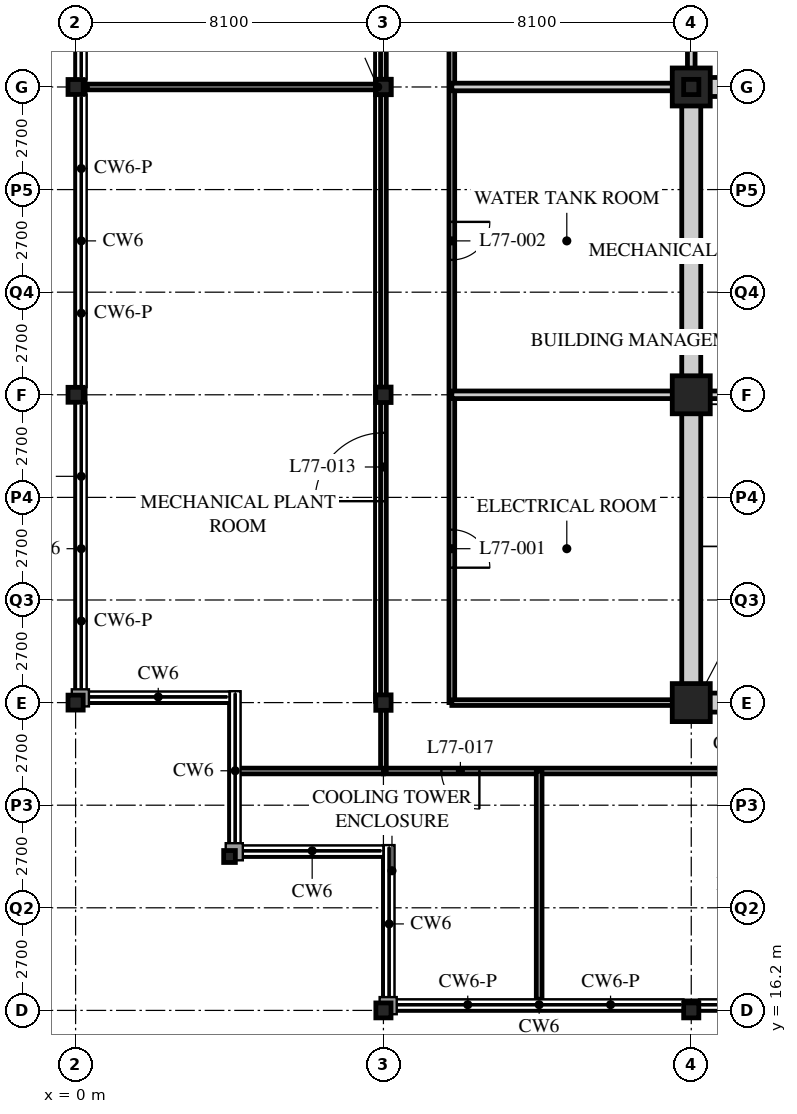
"""IFC4 building model, lengths in metres.
Left out: names, types, materials, properties, quantities, classifications, styles, units other than length and angle.
Written with IfcOpenShell. Run it as: python <this file> out.ifc"""

import sys

from ifc_helpers import new_model, si_unit, direction, frame, frame_2d, origin, origin_2d, place, context, subcontext, project, spatial, rectangle, hollow_rectangle, i_section, extrude, element, fill, save


model = new_model("IFC4")
c1 = context("Model", 3, precision=1e-05, world=origin(), true_north=direction((0.0, 1.0)))
c2 = subcontext(c1, "Body", "Model", "MODEL_VIEW")
j1 = project(units=[si_unit("LENGTHUNIT", "METRE"), si_unit("PLANEANGLEUNIT", "RADIAN")], contexts=[c1])
p1 = place(None, origin())
s1 = spatial("IfcSite", under=j1, at=p1, CompositionType="ELEMENT")
p2 = place(p1, origin())
s2 = spatial("IfcBuilding", under=s1, at=p2, CompositionType="ELEMENT")
p3 = place(p2, frame((0.0, 0.0, 303.9)))
s3 = spatial("IfcBuildingStorey", under=s2, at=p3, CompositionType="ELEMENT", Elevation=303.9)
for number, where, z_axis, x_axis in (
    (1, (0.0, 24.3, 0.0), (0.0, 0.0, 1.0), (1.0, 0.0, 0.0)),
    (2, (0.0, 32.4, 0.0), (0.0, 0.0, 1.0), (1.0, 0.0, 0.0)),
    (3, (0.0, 40.5, 0.0), (0.0, 0.0, 1.0), (1.0, 0.0, 0.0)),
):
    element("IfcColumn", number, at=place(p3, frame(where, z_axis=z_axis, x_axis=x_axis)), inside=s3, PredefinedType="COLUMN", context=c2, shape_type="SweptSolid", body=[
        extrude(i_section(OverallWidth=0.399, OverallDepth=0.394, WebThickness=0.023, FlangeThickness=0.037, FilletRadius=0.015, at=origin_2d()), origin(), (0.0, 0.0, 1.0), 6.0),
    ])
p4 = place(p3, frame((4.05, 20.25, 0.0), z_axis=(0.0, 0.0, 1.0), x_axis=(1.0, 0.0, 0.0)))
e4 = element("IfcColumn", 4, at=p4, inside=s3, PredefinedType="COLUMN", context=c2, shape_type="SweptSolid", body=[
    extrude(i_section(OverallWidth=0.307, OverallDepth=0.314, WebThickness=0.012, FlangeThickness=0.019, FilletRadius=0.015, at=origin_2d()), origin(), (0.0, 0.0, 1.0), 6.0),
])
p5 = place(p3, frame((8.1, 16.2, 0.0), z_axis=(0.0, 0.0, 1.0), x_axis=(1.0, 0.0, 0.0)))
e5 = element("IfcColumn", 5, at=p5, inside=s3, PredefinedType="COLUMN", context=c2, shape_type="SweptSolid", body=[
    extrude(i_section(OverallWidth=0.399, OverallDepth=0.394, WebThickness=0.023, FlangeThickness=0.037, FilletRadius=0.015, at=origin_2d()), origin(), (0.0, 0.0, 1.0), 6.0),
])
for number, where, z_axis, x_axis in (
    (6, (8.1, 24.3, 0.0), (0.0, 0.0, 1.0), (1.0, 0.0, 0.0)),
    (7, (8.1, 32.4, 0.0), (0.0, 0.0, 1.0), (1.0, 0.0, 0.0)),
    (8, (8.1, 40.5, 0.0), (0.0, 0.0, 1.0), (1.0, 0.0, 0.0)),
):
    element("IfcColumn", number, at=place(p3, frame(where, z_axis=z_axis, x_axis=x_axis)), inside=s3, PredefinedType="COLUMN", context=c2, shape_type="SweptSolid", body=[
        extrude(i_section(OverallWidth=0.403, OverallDepth=0.406, WebThickness=0.027, FlangeThickness=0.043, FilletRadius=0.015, at=origin_2d()), origin(), (0.0, 0.0, 1.0), 6.0),
    ])
p6 = place(p3, frame((16.2, 16.2, 0.0), z_axis=(0.0, 0.0, 1.0), x_axis=(1.0, 0.0, 0.0)))
e9 = element("IfcColumn", 9, at=p6, inside=s3, PredefinedType="COLUMN", context=c2, shape_type="SweptSolid", body=[
    extrude(i_section(OverallWidth=0.399, OverallDepth=0.394, WebThickness=0.023, FlangeThickness=0.037, FilletRadius=0.015, at=origin_2d()), origin(), (0.0, 0.0, 1.0), 6.0),
])
for number, where, z_axis, x_axis in (
    (10, (16.2, 24.3, 0.0), (0.0, 0.0, 1.0), (1.0, 0.0, 0.0)),
    (11, (16.2, 32.4, 0.0), (0.0, 0.0, 1.0), (1.0, 0.0, 0.0)),
    (12, (16.2, 40.5, 0.0), (0.0, 0.0, 1.0), (1.0, 0.0, 0.0)),
):
    element("IfcColumn", number, at=place(p3, frame(where, z_axis=z_axis, x_axis=x_axis)), inside=s3, PredefinedType="COLUMN", context=c2, shape_type="SweptSolid", body=[
        extrude(hollow_rectangle(XDim=1.0, YDim=1.0, WallThickness=0.1, at=origin_2d()), origin(), (0.0, 0.0, 1.0), 6.0),
    ])
p7 = place(p3, frame((8.35, 16.325, 6.0), z_axis=(0.0, 0.0, 1.0), x_axis=(1.0, 0.0, 0.0)))
e13 = element("IfcWall", 13, at=p7, inside=s3, PredefinedType="PARAPET", context=c2, shape_type="SweptSolid", body=[
    extrude(rectangle(XDim=40.25, YDim=0.25, at=frame_2d((20.125, 0.0))), origin(), (0.0, 0.0, 1.0), 1.285),
])
p8 = place(p3, frame((0.125, 56.45, 6.0), z_axis=(0.0, 0.0, 1.0), x_axis=(0.0, -1.0, 0.0)))
e14 = element("IfcWall", 14, at=p8, inside=s3, PredefinedType="PARAPET", context=c2, shape_type="SweptSolid", body=[
    extrude(rectangle(XDim=32.15, YDim=0.25, at=frame_2d((16.075, 0.0))), origin(), (0.0, 0.0, 1.0), 1.285),
])
p9 = place(p3, frame((0.25, 24.425, 6.0), z_axis=(0.0, 0.0, 1.0), x_axis=(1.0, 0.0, 0.0)))
e15 = element("IfcWall", 15, at=p9, inside=s3, PredefinedType="PARAPET", context=c2, shape_type="SweptSolid", body=[
    extrude(rectangle(XDim=3.8, YDim=0.25, at=frame_2d((1.9, 0.0))), origin(), (0.0, 0.0, 1.0), 1.285),
])
p10 = place(p3, frame((4.175, 24.55, 6.0), z_axis=(0.0, 0.0, 1.0), x_axis=(0.0, -1.0, 0.0)))
e16 = element("IfcWall", 16, at=p10, inside=s3, PredefinedType="PARAPET", context=c2, shape_type="SweptSolid", body=[
    extrude(rectangle(XDim=4.3, YDim=0.25, at=frame_2d((2.15, 0.0))), origin(), (0.0, 0.0, 1.0), 1.285),
])
p11 = place(p3, frame((4.3, 20.375, 6.0), z_axis=(0.0, 0.0, 1.0), x_axis=(1.0, 0.0, 0.0)))
e17 = element("IfcWall", 17, at=p11, inside=s3, PredefinedType="PARAPET", context=c2, shape_type="SweptSolid", body=[
    extrude(rectangle(XDim=3.8, YDim=0.25, at=frame_2d((1.9, 0.0))), origin(), (0.0, 0.0, 1.0), 1.285),
])
p12 = place(p3, frame((8.225, 20.5, 6.0), z_axis=(0.0, 0.0, 1.0), x_axis=(0.0, -1.0, 0.0)))
e18 = element("IfcWall", 18, at=p12, inside=s3, PredefinedType="PARAPET", context=c2, shape_type="SweptSolid", body=[
    extrude(rectangle(XDim=4.3, YDim=0.25, at=frame_2d((2.15, 0.0))), origin(), (0.0, 0.0, 1.0), 1.285),
])
for number, where, z_axis, x_axis in (
    (19, (8.1, 40.5, 6.0), (0.0, 0.0, 1.0), (1.0, 0.0, 0.0)),
    (20, (16.2, 40.5, 6.0), (0.0, 0.0, 1.0), (1.0, 0.0, 0.0)),
):
    element("IfcColumn", number, at=place(p3, frame(where, z_axis=z_axis, x_axis=x_axis)), inside=s3, PredefinedType="COLUMN", context=c2, shape_type="SweptSolid", body=[
        extrude(hollow_rectangle(XDim=0.4, YDim=0.4, WallThickness=0.016, at=origin_2d()), origin(), (0.0, 0.0, 1.0), 13.896),
    ])
p13 = place(p3, frame((8.1, 22.5, 0.0), z_axis=(0.0, 0.0, 1.0), x_axis=(1.0, 0.0, 0.0)))
e21 = element("IfcWall", 21, at=p13, inside=s3, PredefinedType="PARTITIONING", context=c2, shape_type="SweptSolid", body=[
    extrude(rectangle(XDim=40.5, YDim=0.15, at=frame_2d((20.25, 0.0))), origin(), (0.0, 0.0, 1.0), 5.8),
])
p14 = place(p13, frame((11.25, 0.0, 0.0)))
e22 = element("IfcOpeningElement", 22, at=p14, cuts=e21, PredefinedType="OPENING", context=c2, shape_type="SweptSolid", body=[
    extrude(rectangle(XDim=1.8, YDim=2.4, at=frame_2d((0.9, 1.2))), frame((0.0, 0.085, 0.0), z_axis=(0.0, -1.0, 0.0), x_axis=(1.0, 0.0, 0.0)), (0.0, 0.0, 1.0), 0.17),
])
p15 = place(p13, frame((27.45, 0.0, 0.0)))
e23 = element("IfcOpeningElement", 23, at=p15, cuts=e21, PredefinedType="OPENING", context=c2, shape_type="SweptSolid", body=[
    extrude(rectangle(XDim=1.8, YDim=2.4, at=frame_2d((0.9, 1.2))), frame((0.0, 0.085, 0.0), z_axis=(0.0, -1.0, 0.0), x_axis=(1.0, 0.0, 0.0)), (0.0, 0.0, 1.0), 0.17),
])
p16 = place(p13, frame((1.525, 0.0, 0.0)))
e24 = element("IfcOpeningElement", 24, at=p16, cuts=e21, PredefinedType="OPENING", context=c2, shape_type="SweptSolid", body=[
    extrude(rectangle(XDim=1.0, YDim=2.1, at=frame_2d((0.5, 1.05))), frame((0.0, 0.085, 0.0), z_axis=(0.0, -1.0, 0.0), x_axis=(1.0, 0.0, 0.0)), (0.0, 0.0, 1.0), 0.17),
])
p17 = place(p13, frame((37.975, 0.0, 0.0)))
e25 = element("IfcOpeningElement", 25, at=p17, cuts=e21, PredefinedType="OPENING", context=c2, shape_type="SweptSolid", body=[
    extrude(rectangle(XDim=1.0, YDim=2.1, at=frame_2d((0.5, 1.05))), frame((0.0, 0.085, 0.0), z_axis=(0.0, -1.0, 0.0), x_axis=(1.0, 0.0, 0.0)), (0.0, 0.0, 1.0), 0.17),
])
p18 = place(p3, frame((8.1, 22.5, 0.0), z_axis=(0.0, 0.0, 1.0), x_axis=(0.0, 1.0, 0.0)))
e26 = element("IfcWall", 26, at=p18, inside=s3, PredefinedType="PARTITIONING", context=c2, shape_type="SweptSolid", body=[
    extrude(rectangle(XDim=34.24, YDim=0.15, at=frame_2d((17.12, 0.0))), origin(), (0.0, 0.0, 1.0), 5.038),
])
p19 = place(p18, frame((7.1, 0.0, 0.0)))
e27 = element("IfcOpeningElement", 27, at=p19, cuts=e26, PredefinedType="OPENING", context=c2, shape_type="SweptSolid", body=[
    extrude(rectangle(XDim=1.8, YDim=2.4, at=frame_2d((0.9, 1.2))), frame((0.0, 0.085, 0.0), z_axis=(0.0, -1.0, 0.0), x_axis=(1.0, 0.0, 0.0)), (0.0, 0.0, 1.0), 0.17),
])
p20 = place(p18, frame((26.95, 0.0, 0.0)))
e28 = element("IfcOpeningElement", 28, at=p20, cuts=e26, PredefinedType="OPENING", context=c2, shape_type="SweptSolid", body=[
    extrude(rectangle(XDim=1.8, YDim=2.4, at=frame_2d((0.9, 1.2))), frame((0.0, 0.085, 0.0), z_axis=(0.0, -1.0, 0.0), x_axis=(1.0, 0.0, 0.0)), (0.0, 0.0, 1.0), 0.17),
])
p21 = place(p3, frame((9.9, 54.9, 0.0), z_axis=(0.0, 0.0, 1.0), x_axis=(0.0, -1.0, 0.0)))
e29 = element("IfcWall", 29, at=p21, inside=s3, PredefinedType="PARTITIONING", context=c2, shape_type="SweptSolid", body=[
    extrude(rectangle(XDim=30.6, YDim=0.15, at=frame_2d((15.3, 0.0))), origin(), (0.0, 0.0, 1.0), 5.8),
])
p22 = place(p21, frame((26.05, 0.0, 0.0)))
e30 = element("IfcOpeningElement", 30, at=p22, cuts=e29, PredefinedType="OPENING", context=c2, shape_type="SweptSolid", body=[
    extrude(rectangle(XDim=1.0, YDim=2.1, at=frame_2d((0.5, 1.05))), frame((0.0, 0.085, 0.0), z_axis=(0.0, -1.0, 0.0), x_axis=(1.0, 0.0, 0.0)), (0.0, 0.0, 1.0), 0.17),
])
p23 = place(p21, frame((17.95, 0.0, 0.0)))
e31 = element("IfcOpeningElement", 31, at=p23, cuts=e29, PredefinedType="OPENING", context=c2, shape_type="SweptSolid", body=[
    extrude(rectangle(XDim=1.0, YDim=2.1, at=frame_2d((0.5, 1.05))), frame((0.0, 0.085, 0.0), z_axis=(0.0, -1.0, 0.0), x_axis=(1.0, 0.0, 0.0)), (0.0, 0.0, 1.0), 0.17),
])
p24 = place(p3, frame((9.9, 24.3, 0.0), z_axis=(0.0, 0.0, 1.0), x_axis=(1.0, 0.0, 0.0)))
e32 = element("IfcWall", 32, at=p24, inside=s3, PredefinedType="PARTITIONING", context=c2, shape_type="SweptSolid", body=[
    extrude(rectangle(XDim=6.1, YDim=0.15, at=frame_2d((3.05, 0.0))), origin(), (0.0, 0.0, 1.0), 5.038),
])
p25 = place(p3, frame((9.9, 32.4, 0.0), z_axis=(0.0, 0.0, 1.0), x_axis=(1.0, 0.0, 0.0)))
e33 = element("IfcWall", 33, at=p25, inside=s3, PredefinedType="SOLIDWALL", context=c2, shape_type="SweptSolid", body=[
    extrude(rectangle(XDim=6.3, YDim=0.2, at=frame_2d((3.15, 0.0))), origin(), (0.0, 0.0, 1.0), 5.038),
])
p26 = place(p3, frame((16.2, 40.5, 0.0), z_axis=(0.0, 0.0, 1.0), x_axis=(0.0, 1.0, 0.0)))
e34 = element("IfcWall", 34, at=p26, inside=s3, PredefinedType="SOLIDWALL", context=c2, shape_type="SweptSolid", body=[
    extrude(rectangle(XDim=14.4, YDim=0.2, at=frame_2d((7.2, 0.0))), origin(), (0.0, 0.0, 1.0), 5.038),
])
p27 = place(p3, frame((9.9, 40.5, 0.0), z_axis=(0.0, 0.0, 1.0), x_axis=(1.0, 0.0, 0.0)))
e35 = element("IfcWall", 35, at=p27, inside=s3, PredefinedType="SOLIDWALL", context=c2, shape_type="SweptSolid", body=[
    extrude(rectangle(XDim=6.3, YDim=0.2, at=frame_2d((3.15, 0.0))), origin(), (0.0, 0.0, 1.0), 5.038),
])
p28 = place(p3, frame((8.1, 40.5, 0.0), z_axis=(0.0, 0.0, 1.0), x_axis=(-1.0, 0.0, 0.0)))
e36 = element("IfcWall", 36, at=p28, inside=s3, PredefinedType="PARTITIONING", context=c2, shape_type="SweptSolid", body=[
    extrude(rectangle(XDim=7.8, YDim=0.15, at=frame_2d((3.9, 0.0))), origin(), (0.0, 0.0, 1.0), 5.038),
])
p29 = place(p3, frame((4.223, 22.5, 0.0), z_axis=(0.0, 0.0, 1.0), x_axis=(1.0, 0.0, 0.0)))
e37 = element("IfcWall", 37, at=p29, inside=s3, PredefinedType="PARTITIONING", context=c2, shape_type="SweptSolid", body=[
    extrude(rectangle(XDim=3.877, YDim=0.15, at=frame_2d((1.938, 0.0))), origin(), (0.0, 0.0, 1.0), 5.8),
])
p30 = place(p3, frame((12.198, 22.5, 0.0), z_axis=(0.0, 0.0, 1.0), x_axis=(0.0, -1.0, 0.0)))
e38 = element("IfcWall", 38, at=p30, inside=s3, PredefinedType="PARTITIONING", context=c2, shape_type="SweptSolid", body=[
    extrude(rectangle(XDim=6.007, YDim=0.15, at=frame_2d((3.003, 0.0))), origin(), (0.0, 0.0, 1.0), 5.8),
])
p31 = place(p3, frame((15.95, 24.3, 0.0), z_axis=(0.0, 0.0, 1.0), x_axis=(1.0, 0.0, 0.0)))
e39 = element("IfcWall", 39, at=p31, inside=s3, PredefinedType="SOLIDWALL", context=c2, shape_type="SweptSolid", body=[
    extrude(rectangle(XDim=24.8, YDim=0.5, at=frame_2d((12.4, 0.0))), origin(), (0.0, 0.0, 1.0), 5.038),
])
p32 = place(p31, frame((11.5, 0.0, 0.0)))
e40 = element("IfcOpeningElement", 40, at=p32, cuts=e39, PredefinedType="OPENING", context=c2, shape_type="SweptSolid", body=[
    extrude(rectangle(XDim=1.8, YDim=2.4, at=frame_2d((0.9, 1.2))), frame((0.0, 0.26, 0.0), z_axis=(0.0, -1.0, 0.0), x_axis=(1.0, 0.0, 0.0)), (0.0, 0.0, 1.0), 0.52),
])
p33 = place(p3, frame((15.95, 40.5, 0.0), z_axis=(0.0, 0.0, 1.0), x_axis=(1.0, 0.0, 0.0)))
e41 = element("IfcWall", 41, at=p33, inside=s3, PredefinedType="SOLIDWALL", context=c2, shape_type="SweptSolid", body=[
    extrude(rectangle(XDim=24.8, YDim=0.5, at=frame_2d((12.4, 0.0))), origin(), (0.0, 0.0, 1.0), 5.038),
])
p34 = place(p33, frame((11.5, 0.0, 0.0)))
e42 = element("IfcOpeningElement", 42, at=p34, cuts=e41, PredefinedType="OPENING", context=c2, shape_type="SweptSolid", body=[
    extrude(rectangle(XDim=1.8, YDim=2.4, at=frame_2d((0.9, 1.2))), frame((0.0, 0.26, 0.0), z_axis=(0.0, -1.0, 0.0), x_axis=(1.0, 0.0, 0.0)), (0.0, 0.0, 1.0), 0.52),
])
p35 = place(p3, frame((16.2, 24.55, 0.0), z_axis=(0.0, 0.0, 1.0), x_axis=(0.0, 1.0, 0.0)))
e43 = element("IfcWall", 43, at=p35, inside=s3, PredefinedType="SOLIDWALL", context=c2, shape_type="SweptSolid", body=[
    extrude(rectangle(XDim=15.7, YDim=0.5, at=frame_2d((7.85, 0.0))), origin(), (0.0, 0.0, 1.0), 5.038),
])
p36 = place(p3, frame((16.45, 32.4, 0.0), z_axis=(0.0, 0.0, 1.0), x_axis=(1.0, 0.0, 0.0)))
e44 = element("IfcWall", 44, at=p36, inside=s3, PredefinedType="SOLIDWALL", context=c2, shape_type="SweptSolid", body=[
    extrude(rectangle(XDim=7.95, YDim=0.2, at=frame_2d((3.975, 0.0))), origin(), (0.0, 0.0, 1.0), 5.038),
])
p37 = place(p22, origin())
e45 = element("IfcDoor", 45, at=p37, inside=s3, OperationType="SINGLE_SWING_RIGHT", PredefinedType="DOOR", context=c2, shape_type="SweptSolid", body=[
    extrude(rectangle(XDim=1.0, YDim=2.1, at=frame_2d((0.5, 1.05))), frame((0.0, 0.025, 0.0), z_axis=(0.0, -1.0, 0.0), x_axis=(1.0, 0.0, 0.0)), (0.0, 0.0, 1.0), 0.05),
])
fill(e30, e45)
p38 = place(p23, origin())
e46 = element("IfcDoor", 46, at=p38, inside=s3, OperationType="SINGLE_SWING_LEFT", PredefinedType="DOOR", context=c2, shape_type="SweptSolid", body=[
    extrude(rectangle(XDim=1.0, YDim=2.1, at=frame_2d((0.5, 1.05))), frame((0.0, 0.025, 0.0), z_axis=(0.0, -1.0, 0.0), x_axis=(1.0, 0.0, 0.0)), (0.0, 0.0, 1.0), 0.05),
])
fill(e31, e46)
p39 = place(p19, origin())
e47 = element("IfcDoor", 47, at=p39, inside=s3, OperationType="DOUBLE_DOOR_SINGLE_SWING", PredefinedType="DOOR", context=c2, shape_type="SweptSolid", body=[
    extrude(rectangle(XDim=1.8, YDim=2.4, at=frame_2d((0.9, 1.2))), frame((0.0, 0.025, 0.0), z_axis=(0.0, -1.0, 0.0), x_axis=(1.0, 0.0, 0.0)), (0.0, 0.0, 1.0), 0.05),
])
fill(e27, e47)
p40 = place(p16, origin())
e48 = element("IfcDoor", 48, at=p40, inside=s3, OperationType="SINGLE_SWING_LEFT", PredefinedType="DOOR", context=c2, shape_type="SweptSolid", body=[
    extrude(rectangle(XDim=1.0, YDim=2.1, at=frame_2d((0.5, 1.05))), frame((0.0, 0.025, 0.0), z_axis=(0.0, -1.0, 0.0), x_axis=(1.0, 0.0, 0.0)), (0.0, 0.0, 1.0), 0.05),
])
fill(e24, e48)
save(model, sys.argv[1])
